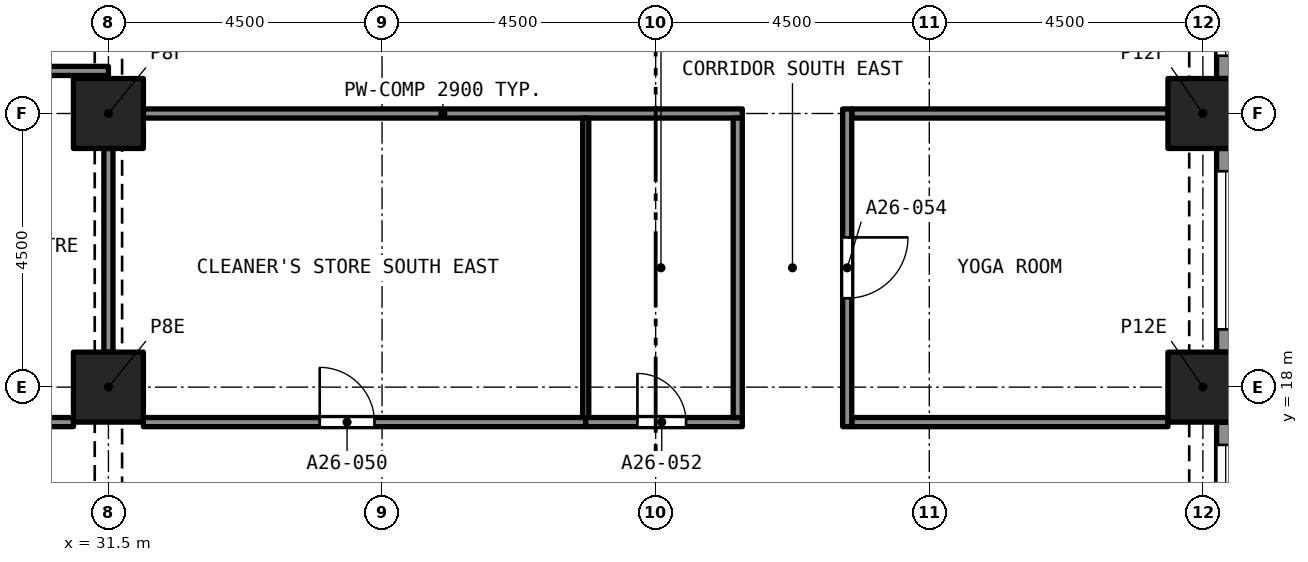
"""IFC4 building model, lengths in metres.
Left out: names, types, materials, properties, quantities, classifications, styles, units other than length and angle.
Written with IfcOpenShell. Run it as: python <this file> out.ifc"""

import sys

from ifc_helpers import new_model, si_unit, direction, frame, frame_2d, origin, origin_2d, place, context, subcontext, project, spatial, rectangle, extrude, element, fill, save


model = new_model("IFC4")
c1 = context("Model", 3, precision=1e-05, world=origin(), true_north=direction((0.0, 1.0)))
c2 = subcontext(c1, "Body", "Model", "MODEL_VIEW")
j1 = project(units=[si_unit("LENGTHUNIT", "METRE"), si_unit("PLANEANGLEUNIT", "RADIAN")], contexts=[c1])
p1 = place(None, origin())
s1 = spatial("IfcSite", under=j1, at=p1, CompositionType="ELEMENT")
p2 = place(p1, origin())
s2 = spatial("IfcBuilding", under=s1, at=p2, CompositionType="ELEMENT")
p3 = place(p2, frame((0.0, 0.0, 96.0)))
s3 = spatial("IfcBuildingStorey", under=s2, at=p3, CompositionType="ELEMENT", Elevation=96.0)
for number, where, z_axis, x_axis in (
    (1, (31.5, 18.0, 0.0), (0.0, 0.0, 1.0), (1.0, 0.0, 0.0)),
    (2, (49.5, 18.0, 0.0), (0.0, 0.0, 1.0), (1.0, 0.0, 0.0)),
    (3, (31.5, 22.5, 0.0), (0.0, 0.0, 1.0), (1.0, 0.0, 0.0)),
    (4, (49.5, 22.5, 0.0), (0.0, 0.0, 1.0), (1.0, 0.0, 0.0)),
):
    element("IfcColumn", number, at=place(p3, frame(where, z_axis=z_axis, x_axis=x_axis)), inside=s3, PredefinedType="COLUMN", context=c2, shape_type="SweptSolid", body=[
        extrude(rectangle(XDim=1.15, YDim=1.15, at=origin_2d()), origin(), (0.0, 0.0, 1.0), 3.2),
    ])
p4 = place(p3, frame((49.875, 17.425, 0.0), z_axis=(0.0, 0.0, 1.0), x_axis=(0.0, -1.0, 0.0)))
e5 = element("IfcWall", 5, at=p4, inside=s3, PredefinedType="SOLIDWALL", context=c2, shape_type="SweptSolid", body=[
    extrude(rectangle(XDim=3.35, YDim=0.3, at=frame_2d((1.675, 0.0))), origin(), (0.0, 0.0, 1.0), 3.2),
])
p5 = place(p4, frame((0.375, 0.0, 0.45)))
e6 = element("IfcOpeningElement", 6, at=p5, cuts=e5, PredefinedType="OPENING", context=c2, shape_type="SweptSolid", body=[
    extrude(rectangle(XDim=2.6, YDim=1.95, at=frame_2d((1.3, 0.975))), frame((0.0, 0.16, 0.0), z_axis=(0.0, -1.0, 0.0), x_axis=(1.0, 0.0, 0.0)), (0.0, 0.0, 1.0), 0.32),
])
p6 = place(p3, frame((49.875, 21.925, 0.0), z_axis=(0.0, 0.0, 1.0), x_axis=(0.0, -1.0, 0.0)))
e7 = element("IfcWall", 7, at=p6, inside=s3, PredefinedType="SOLIDWALL", context=c2, shape_type="SweptSolid", body=[
    extrude(rectangle(XDim=3.35, YDim=0.3, at=frame_2d((1.675, 0.0))), origin(), (0.0, 0.0, 1.0), 3.2),
])
p7 = place(p6, frame((0.375, 0.0, 0.45)))
e8 = element("IfcOpeningElement", 8, at=p7, cuts=e7, PredefinedType="OPENING", context=c2, shape_type="SweptSolid", body=[
    extrude(rectangle(XDim=2.6, YDim=1.95, at=frame_2d((1.3, 0.975))), frame((0.0, 0.16, 0.0), z_axis=(0.0, -1.0, 0.0), x_axis=(1.0, 0.0, 0.0)), (0.0, 0.0, 1.0), 0.32),
])
p8 = place(p3, frame((49.875, 26.425, 0.0), z_axis=(0.0, 0.0, 1.0), x_axis=(0.0, -1.0, 0.0)))
e9 = element("IfcWall", 9, at=p8, inside=s3, PredefinedType="SOLIDWALL", context=c2, shape_type="SweptSolid", body=[
    extrude(rectangle(XDim=3.35, YDim=0.3, at=frame_2d((1.675, 0.0))), origin(), (0.0, 0.0, 1.0), 3.2),
])
p9 = place(p8, frame((0.375, 0.0, 0.45)))
e10 = element("IfcOpeningElement", 10, at=p9, cuts=e9, PredefinedType="OPENING", context=c2, shape_type="SweptSolid", body=[
    extrude(rectangle(XDim=2.6, YDim=1.95, at=frame_2d((1.3, 0.975))), frame((0.0, 0.16, 0.0), z_axis=(0.0, -1.0, 0.0), x_axis=(1.0, 0.0, 0.0)), (0.0, 0.0, 1.0), 0.32),
])
p10 = place(p3, frame((25.725, 17.425, 0.0), z_axis=(0.0, 0.0, 1.0), x_axis=(1.0, 0.0, 0.0)))
e11 = element("IfcWall", 11, at=p10, inside=s3, PredefinedType="PARTITIONING", context=c2, shape_type="SweptSolid", body=[
    extrude(rectangle(XDim=5.2, YDim=0.15, at=frame_2d((2.6, 0.0))), origin(), (0.0, 0.0, 1.0), 2.75),
])
p11 = place(p3, frame((32.075, 17.425, 0.0), z_axis=(0.0, 0.0, 1.0), x_axis=(1.0, 0.0, 0.0)))
e12 = element("IfcWall", 12, at=p11, inside=s3, PredefinedType="PARTITIONING", context=c2, shape_type="SweptSolid", body=[
    extrude(rectangle(XDim=7.275, YDim=0.15, at=frame_2d((3.638, 0.0))), origin(), (0.0, 0.0, 1.0), 2.9),
])
p12 = place(p11, frame((2.9, 0.0, 0.0)))
e13 = element("IfcOpeningElement", 13, at=p12, cuts=e12, PredefinedType="OPENING", context=c2, shape_type="SweptSolid", body=[
    extrude(rectangle(XDim=0.9, YDim=2.1, at=frame_2d((0.45, 1.05))), frame((0.0, 0.085, 0.0), z_axis=(0.0, -1.0, 0.0), x_axis=(1.0, 0.0, 0.0)), (0.0, 0.0, 1.0), 0.17),
])
p13 = place(p3, frame((39.35, 17.425, 0.0), z_axis=(0.0, 0.0, 1.0), x_axis=(1.0, 0.0, 0.0)))
e14 = element("IfcWall", 14, at=p13, inside=s3, PredefinedType="PARTITIONING", context=c2, shape_type="SweptSolid", body=[
    extrude(rectangle(XDim=2.575, YDim=0.15, at=frame_2d((1.288, 0.0))), origin(), (0.0, 0.0, 1.0), 2.9),
])
p14 = place(p13, frame((0.85, 0.0, 0.0)))
e15 = element("IfcOpeningElement", 15, at=p14, cuts=e14, PredefinedType="OPENING", context=c2, shape_type="SweptSolid", body=[
    extrude(rectangle(XDim=0.8, YDim=2.1, at=frame_2d((0.4, 1.05))), frame((0.0, 0.085, 0.0), z_axis=(0.0, -1.0, 0.0), x_axis=(1.0, 0.0, 0.0)), (0.0, 0.0, 1.0), 0.17),
])
p15 = place(p3, frame((43.725, 17.425, 0.0), z_axis=(0.0, 0.0, 1.0), x_axis=(1.0, 0.0, 0.0)))
e16 = element("IfcWall", 16, at=p15, inside=s3, PredefinedType="PARTITIONING", context=c2, shape_type="SweptSolid", body=[
    extrude(rectangle(XDim=5.2, YDim=0.15, at=frame_2d((2.6, 0.0))), origin(), (0.0, 0.0, 1.0), 2.9),
])
p16 = place(p3, frame((25.725, 23.2, 0.0), z_axis=(0.0, 0.0, 1.0), x_axis=(1.0, 0.0, 0.0)))
e17 = element("IfcWall", 17, at=p16, inside=s3, PredefinedType="PARTITIONING", context=c2, shape_type="SweptSolid", body=[
    extrude(rectangle(XDim=5.775, YDim=0.15, at=frame_2d((2.887, 0.0))), origin(), (0.0, 0.0, 1.0), 2.75),
])
p17 = place(p3, frame((31.5, 18.575, 0.0), z_axis=(0.0, 0.0, 1.0), x_axis=(0.0, 1.0, 0.0)))
e18 = element("IfcWall", 18, at=p17, inside=s3, PredefinedType="PARTITIONING", context=c2, shape_type="SweptSolid", body=[
    extrude(rectangle(XDim=3.35, YDim=0.15, at=frame_2d((1.675, 0.0))), origin(), (0.0, 0.0, 1.0), 2.38),
])
p18 = place(p3, frame((32.075, 22.5, 0.0), z_axis=(0.0, 0.0, 1.0), x_axis=(1.0, 0.0, 0.0)))
e19 = element("IfcWall", 19, at=p18, inside=s3, PredefinedType="PARTITIONING", context=c2, shape_type="SweptSolid", body=[
    extrude(rectangle(XDim=9.85, YDim=0.15, at=frame_2d((4.925, 0.0))), origin(), (0.0, 0.0, 1.0), 2.9),
])
p19 = place(p3, frame((43.725, 22.5, 0.0), z_axis=(0.0, 0.0, 1.0), x_axis=(1.0, 0.0, 0.0)))
e20 = element("IfcWall", 20, at=p19, inside=s3, PredefinedType="PARTITIONING", context=c2, shape_type="SweptSolid", body=[
    extrude(rectangle(XDim=5.2, YDim=0.15, at=frame_2d((2.6, 0.0))), origin(), (0.0, 0.0, 1.0), 2.9),
])
p20 = place(p3, frame((41.85, 17.5, 0.0), z_axis=(0.0, 0.0, 1.0), x_axis=(0.0, 1.0, 0.0)))
e21 = element("IfcWall", 21, at=p20, inside=s3, PredefinedType="PARTITIONING", context=c2, shape_type="SweptSolid", body=[
    extrude(rectangle(XDim=4.925, YDim=0.15, at=frame_2d((2.462, 0.0))), origin(), (0.0, 0.0, 1.0), 2.9),
])
p21 = place(p3, frame((43.65, 22.575, 0.0), z_axis=(0.0, 0.0, 1.0), x_axis=(0.0, -1.0, 0.0)))
e22 = element("IfcWall", 22, at=p21, inside=s3, PredefinedType="PARTITIONING", context=c2, shape_type="SweptSolid", body=[
    extrude(rectangle(XDim=5.225, YDim=0.15, at=frame_2d((2.612, 0.0))), origin(), (0.0, 0.0, 1.0), 2.9),
])
p22 = place(p21, frame((2.113, 0.0, 0.0)))
e23 = element("IfcOpeningElement", 23, at=p22, cuts=e22, PredefinedType="OPENING", context=c2, shape_type="SweptSolid", body=[
    extrude(rectangle(XDim=1.0, YDim=2.1, at=frame_2d((0.5, 1.05))), frame((0.0, 0.085, 0.0), z_axis=(0.0, -1.0, 0.0), x_axis=(1.0, 0.0, 0.0)), (0.0, 0.0, 1.0), 0.17),
])
p23 = place(p3, frame((39.35, 17.5, 0.0), z_axis=(0.0, 0.0, 1.0), x_axis=(0.0, 1.0, 0.0)))
e24 = element("IfcWall", 24, at=p23, inside=s3, PredefinedType="PARTITIONING", context=c2, shape_type="SweptSolid", body=[
    extrude(rectangle(XDim=4.925, YDim=0.1, at=frame_2d((2.462, 0.0))), origin(), (0.0, 0.0, 1.0), 2.9),
])
p24 = place(p5, origin())
e25 = element("IfcWindow", 25, at=p24, inside=s3, PartitioningType="SINGLE_PANEL", PredefinedType="WINDOW", context=c2, shape_type="SweptSolid", body=[
    extrude(rectangle(XDim=2.6, YDim=1.95, at=frame_2d((1.3, 0.975))), frame((0.0, 0.03, 0.0), z_axis=(0.0, -1.0, 0.0), x_axis=(1.0, 0.0, 0.0)), (0.0, 0.0, 1.0), 0.06),
])
fill(e6, e25)
p25 = place(p7, origin())
e26 = element("IfcWindow", 26, at=p25, inside=s3, PartitioningType="SINGLE_PANEL", PredefinedType="WINDOW", context=c2, shape_type="SweptSolid", body=[
    extrude(rectangle(XDim=2.6, YDim=1.95, at=frame_2d((1.3, 0.975))), frame((0.0, 0.03, 0.0), z_axis=(0.0, -1.0, 0.0), x_axis=(1.0, 0.0, 0.0)), (0.0, 0.0, 1.0), 0.06),
])
fill(e8, e26)
p26 = place(p9, origin())
e27 = element("IfcWindow", 27, at=p26, inside=s3, PartitioningType="SINGLE_PANEL", PredefinedType="WINDOW", context=c2, shape_type="SweptSolid", body=[
    extrude(rectangle(XDim=2.6, YDim=1.95, at=frame_2d((1.3, 0.975))), frame((0.0, 0.03, 0.0), z_axis=(0.0, -1.0, 0.0), x_axis=(1.0, 0.0, 0.0)), (0.0, 0.0, 1.0), 0.06),
])
fill(e10, e27)
p27 = place(p12, origin())
e28 = element("IfcDoor", 28, at=p27, inside=s3, OperationType="SINGLE_SWING_LEFT", PredefinedType="DOOR", context=c2, shape_type="SweptSolid", body=[
    extrude(rectangle(XDim=0.9, YDim=2.1, at=frame_2d((0.45, 1.05))), frame((0.0, 0.025, 0.0), z_axis=(0.0, -1.0, 0.0), x_axis=(1.0, 0.0, 0.0)), (0.0, 0.0, 1.0), 0.05),
])
fill(e13, e28)
p28 = place(p14, origin())
e29 = element("IfcDoor", 29, at=p28, inside=s3, OperationType="SINGLE_SWING_LEFT", PredefinedType="DOOR", context=c2, shape_type="SweptSolid", body=[
    extrude(rectangle(XDim=0.8, YDim=2.1, at=frame_2d((0.4, 1.05))), frame((0.0, 0.025, 0.0), z_axis=(0.0, -1.0, 0.0), x_axis=(1.0, 0.0, 0.0)), (0.0, 0.0, 1.0), 0.05),
])
fill(e15, e29)
p29 = place(p22, origin())
e30 = element("IfcDoor", 30, at=p29, inside=s3, OperationType="SINGLE_SWING_RIGHT", PredefinedType="DOOR", context=c2, shape_type="SweptSolid", body=[
    extrude(rectangle(XDim=1.0, YDim=2.1, at=frame_2d((0.5, 1.05))), frame((0.0, 0.025, 0.0), z_axis=(0.0, -1.0, 0.0), x_axis=(1.0, 0.0, 0.0)), (0.0, 0.0, 1.0), 0.05),
])
fill(e23, e30)
save(model, sys.argv[1])
